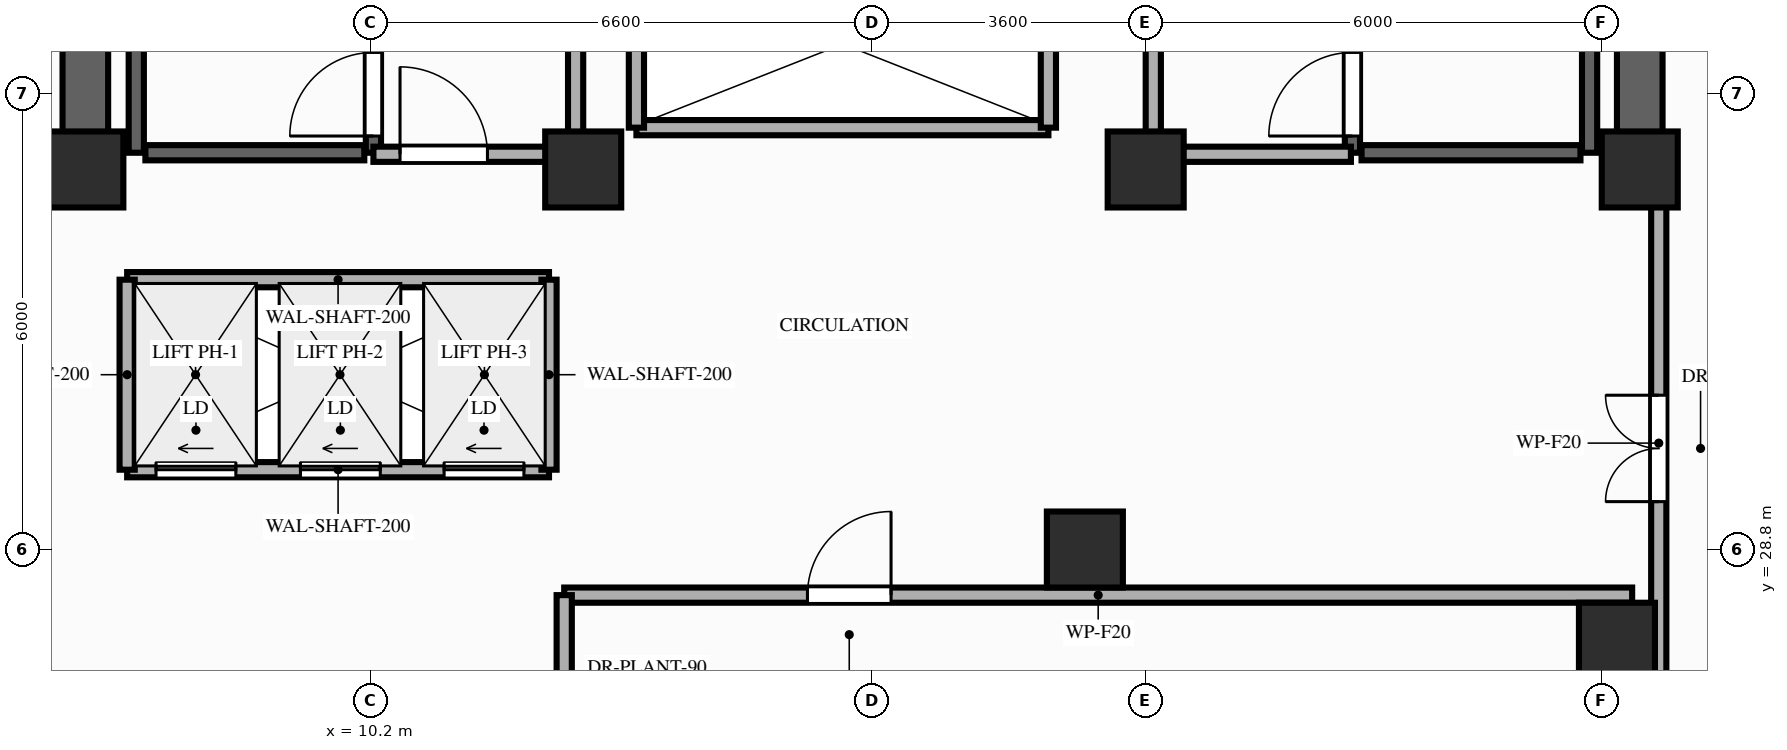
"""IFC4 building model, lengths in metres.
Left out: names, types, materials, properties, quantities, classifications, styles, units other than length and angle.
Written with IfcOpenShell. Run it as: python <this file> out.ifc"""

import sys

from ifc_helpers import new_model, si_unit, direction, frame, frame_2d, origin, origin_2d, place, context, subcontext, project, spatial, rectangle, extrude, element, fill, save


model = new_model("IFC4")
c1 = context("Model", 3, precision=1e-05, world=origin(), true_north=direction((0.0, 1.0)))
c2 = subcontext(c1, "Body", "Model", "MODEL_VIEW")
j1 = project(units=[si_unit("LENGTHUNIT", "METRE"), si_unit("PLANEANGLEUNIT", "RADIAN")], contexts=[c1])
p1 = place(None, origin())
s1 = spatial("IfcSite", under=j1, at=p1, CompositionType="ELEMENT")
p2 = place(p1, origin())
s2 = spatial("IfcBuilding", under=s1, at=p2, CompositionType="ELEMENT")
p3 = place(p2, frame((0.0, 0.0, 156.0)))
s3 = spatial("IfcBuildingStorey", under=s2, at=p3, CompositionType="ELEMENT", Elevation=156.0)
for number, where, z_axis, x_axis in (
    (1, (6.45, 33.8, 0.0), (0.0, 0.0, 1.0), (1.0, 0.0, 0.0)),
    (2, (13.0, 33.8, 0.0), (0.0, 0.0, 1.0), (1.0, 0.0, 0.0)),
    (3, (20.4, 33.8, 0.0), (0.0, 0.0, 1.0), (1.0, 0.0, 0.0)),
    (4, (26.9, 33.8, 0.0), (0.0, 0.0, 1.0), (1.0, 0.0, 0.0)),
    (5, (19.6, 28.8, 0.0), (0.0, 0.0, 1.0), (1.0, 0.0, 0.0)),
    (6, (26.6, 27.6, 0.0), (0.0, 0.0, 1.0), (1.0, 0.0, 0.0)),
):
    element("IfcColumn", number, at=place(p3, frame(where, z_axis=z_axis, x_axis=x_axis)), inside=s3, PredefinedType="COLUMN", context=c2, shape_type="SweptSolid", body=[
        extrude(rectangle(XDim=1.0, YDim=1.0, at=origin_2d()), origin(), (0.0, 0.0, 1.0), 4.0),
    ])
for number, where, z_axis, x_axis in (
    (7, (6.45, 33.8, 0.0), (0.0, 0.0, 1.0), (0.0, 1.0, 0.0)),
    (8, (26.9, 33.8, 0.0), (0.0, 0.0, 1.0), (0.0, 1.0, 0.0)),
):
    element("IfcWall", number, at=place(p3, frame(where, z_axis=z_axis, x_axis=x_axis)), inside=s3, PredefinedType="SHEAR", context=c2, shape_type="SweptSolid", body=[
        extrude(rectangle(XDim=7.95, YDim=0.6, at=frame_2d((3.975, 0.0))), origin(), (0.0, 0.0, 1.0), 3.82),
    ])
p4 = place(p3, frame((7.12, 34.02, 0.0), z_axis=(0.0, 0.0, 1.0), x_axis=(0.0, 1.0, 0.0)))
e9 = element("IfcWall", 9, at=p4, inside=s3, PredefinedType="SHEAR", context=c2, shape_type="SweptSolid", body=[
    extrude(rectangle(XDim=7.78, YDim=0.2, at=frame_2d((3.89, 0.0))), origin(), (0.0, 0.0, 1.0), 3.82),
])
p5 = place(p3, frame((10.24, 34.02, 0.0), z_axis=(0.0, 0.0, 1.0), x_axis=(0.0, 1.0, 0.0)))
e10 = element("IfcWall", 10, at=p5, inside=s3, PredefinedType="SHEAR", context=c2, shape_type="SweptSolid", body=[
    extrude(rectangle(XDim=7.78, YDim=0.2, at=frame_2d((3.89, 0.0))), origin(), (0.0, 0.0, 1.0), 3.82),
])
p6 = place(p5, frame((0.22, 0.0, 0.0)))
e11 = element("IfcOpeningElement", 11, at=p6, cuts=e10, PredefinedType="OPENING", context=c2, shape_type="SweptSolid", body=[
    extrude(rectangle(XDim=1.1, YDim=2.15, at=frame_2d((0.55, 1.075))), frame((0.0, 0.11, 0.0), z_axis=(0.0, -1.0, 0.0), x_axis=(1.0, 0.0, 0.0)), (0.0, 0.0, 1.0), 0.22),
])
p7 = place(p3, frame((7.24, 34.02, 0.0), z_axis=(0.0, 0.0, 1.0), x_axis=(1.0, 0.0, 0.0)))
e12 = element("IfcWall", 12, at=p7, inside=s3, PredefinedType="SHEAR", context=c2, shape_type="SweptSolid", body=[
    extrude(rectangle(XDim=2.88, YDim=0.2, at=frame_2d((1.44, 0.0))), origin(), (0.0, 0.0, 1.0), 3.82),
])
p8 = place(p3, frame((23.12, 34.02, 0.0), z_axis=(0.0, 0.0, 1.0), x_axis=(0.0, 1.0, 0.0)))
e13 = element("IfcWall", 13, at=p8, inside=s3, PredefinedType="SHEAR", context=c2, shape_type="SweptSolid", body=[
    extrude(rectangle(XDim=7.78, YDim=0.2, at=frame_2d((3.89, 0.0))), origin(), (0.0, 0.0, 1.0), 3.82),
])
p9 = place(p8, frame((0.22, 0.0, 0.0)))
e14 = element("IfcOpeningElement", 14, at=p9, cuts=e13, PredefinedType="OPENING", context=c2, shape_type="SweptSolid", body=[
    extrude(rectangle(XDim=1.1, YDim=2.15, at=frame_2d((0.55, 1.075))), frame((0.0, 0.11, 0.0), z_axis=(0.0, -1.0, 0.0), x_axis=(1.0, 0.0, 0.0)), (0.0, 0.0, 1.0), 0.22),
])
p10 = place(p3, frame((26.24, 34.02, 0.0), z_axis=(0.0, 0.0, 1.0), x_axis=(0.0, 1.0, 0.0)))
e15 = element("IfcWall", 15, at=p10, inside=s3, PredefinedType="SHEAR", context=c2, shape_type="SweptSolid", body=[
    extrude(rectangle(XDim=7.78, YDim=0.2, at=frame_2d((3.89, 0.0))), origin(), (0.0, 0.0, 1.0), 3.82),
])
p11 = place(p3, frame((23.24, 34.02, 0.0), z_axis=(0.0, 0.0, 1.0), x_axis=(1.0, 0.0, 0.0)))
e16 = element("IfcWall", 16, at=p11, inside=s3, PredefinedType="SHEAR", context=c2, shape_type="SweptSolid", body=[
    extrude(rectangle(XDim=2.88, YDim=0.2, at=frame_2d((1.44, 0.0))), origin(), (0.0, 0.0, 1.0), 3.82),
])
p12 = place(p3, frame((7.0, 29.85, 0.0), z_axis=(0.0, 0.0, 1.0), x_axis=(1.0, 0.0, 0.0)))
e17 = element("IfcWall", 17, at=p12, inside=s3, PredefinedType="MOVABLE", context=c2, shape_type="SweptSolid", body=[
    extrude(rectangle(XDim=5.55, YDim=0.2, at=frame_2d((2.775, 0.0))), origin(), (0.0, 0.0, 1.0), 3.82),
])
p13 = place(p12, frame((0.38, 0.0, 0.0)))
e18 = element("IfcOpeningElement", 18, at=p13, cuts=e17, PredefinedType="OPENING", context=c2, shape_type="SweptSolid", body=[
    extrude(rectangle(XDim=1.05, YDim=2.15, at=frame_2d((0.525, 1.075))), frame((0.0, 0.11, 0.0), z_axis=(0.0, -1.0, 0.0), x_axis=(1.0, 0.0, 0.0)), (0.0, 0.0, 1.0), 0.22),
])
p14 = place(p12, frame((2.28, 0.0, 0.0)))
e19 = element("IfcOpeningElement", 19, at=p14, cuts=e17, PredefinedType="OPENING", context=c2, shape_type="SweptSolid", body=[
    extrude(rectangle(XDim=1.05, YDim=2.15, at=frame_2d((0.525, 1.075))), frame((0.0, 0.11, 0.0), z_axis=(0.0, -1.0, 0.0), x_axis=(1.0, 0.0, 0.0)), (0.0, 0.0, 1.0), 0.22),
])
p15 = place(p12, frame((4.17, 0.0, 0.0)))
e20 = element("IfcOpeningElement", 20, at=p15, cuts=e17, PredefinedType="OPENING", context=c2, shape_type="SweptSolid", body=[
    extrude(rectangle(XDim=1.05, YDim=2.15, at=frame_2d((0.525, 1.075))), frame((0.0, 0.11, 0.0), z_axis=(0.0, -1.0, 0.0), x_axis=(1.0, 0.0, 0.0)), (0.0, 0.0, 1.0), 0.22),
])
p16 = place(p3, frame((7.0, 32.35, 0.0), z_axis=(0.0, 0.0, 1.0), x_axis=(1.0, 0.0, 0.0)))
e21 = element("IfcWall", 21, at=p16, inside=s3, PredefinedType="MOVABLE", context=c2, shape_type="SweptSolid", body=[
    extrude(rectangle(XDim=5.55, YDim=0.2, at=frame_2d((2.775, 0.0))), origin(), (0.0, 0.0, 1.0), 3.82),
])
for number, where, z_axis, x_axis in (
    (22, (7.0, 29.85, 0.0), (0.0, 0.0, 1.0), (0.0, 1.0, 0.0)),
    (23, (12.55, 29.85, 0.0), (0.0, 0.0, 1.0), (0.0, 1.0, 0.0)),
):
    element("IfcWall", number, at=place(p3, frame(where, z_axis=z_axis, x_axis=x_axis)), inside=s3, PredefinedType="MOVABLE", context=c2, shape_type="SweptSolid", body=[
        extrude(rectangle(XDim=2.5, YDim=0.2, at=frame_2d((1.25, 0.0))), origin(), (0.0, 0.0, 1.0), 3.82),
    ])
p17 = place(p3, frame((12.9, 34.0, 0.0), z_axis=(0.0, 0.0, 1.0), x_axis=(0.0, 1.0, 0.0)))
e24 = element("IfcWall", 24, at=p17, inside=s3, PredefinedType="PARTITIONING", context=c2, shape_type="SweptSolid", body=[
    extrude(rectangle(XDim=5.45, YDim=0.2, at=frame_2d((2.725, 0.0))), origin(), (0.0, 0.0, 1.0), 3.25),
])
p18 = place(p3, frame((10.24, 34.0, 0.0), z_axis=(0.0, 0.0, 1.0), x_axis=(1.0, 0.0, 0.0)))
e25 = element("IfcWall", 25, at=p18, inside=s3, PredefinedType="PARTITIONING", context=c2, shape_type="SweptSolid", body=[
    extrude(rectangle(XDim=2.66, YDim=0.2, at=frame_2d((1.33, 0.0))), origin(), (0.0, 0.0, 1.0), 3.25),
])
p19 = place(p18, frame((0.35, 0.0, 0.0)))
e26 = element("IfcOpeningElement", 26, at=p19, cuts=e25, PredefinedType="OPENING", context=c2, shape_type="SweptSolid", body=[
    extrude(rectangle(XDim=1.15, YDim=2.15, at=frame_2d((0.575, 1.075))), frame((0.0, 0.11, 0.0), z_axis=(0.0, -1.0, 0.0), x_axis=(1.0, 0.0, 0.0)), (0.0, 0.0, 1.0), 0.22),
])
p20 = place(p3, frame((20.5, 34.0, 0.0), z_axis=(0.0, 0.0, 1.0), x_axis=(0.0, 1.0, 0.0)))
e27 = element("IfcWall", 27, at=p20, inside=s3, PredefinedType="PARTITIONING", context=c2, shape_type="SweptSolid", body=[
    extrude(rectangle(XDim=5.45, YDim=0.2, at=frame_2d((2.725, 0.0))), origin(), (0.0, 0.0, 1.0), 3.25),
])
p21 = place(p20, frame((2.0, 0.0, 0.0)))
e28 = element("IfcOpeningElement", 28, at=p21, cuts=e27, PredefinedType="OPENING", context=c2, shape_type="SweptSolid", body=[
    extrude(rectangle(XDim=1.15, YDim=2.15, at=frame_2d((0.575, 1.075))), frame((0.0, 0.11, 0.0), z_axis=(0.0, -1.0, 0.0), x_axis=(1.0, 0.0, 0.0)), (0.0, 0.0, 1.0), 0.22),
])
p22 = place(p3, frame((20.5, 34.0, 0.0), z_axis=(0.0, 0.0, 1.0), x_axis=(1.0, 0.0, 0.0)))
e29 = element("IfcWall", 29, at=p22, inside=s3, PredefinedType="PARTITIONING", context=c2, shape_type="SweptSolid", body=[
    extrude(rectangle(XDim=2.6, YDim=0.2, at=frame_2d((1.3, 0.0))), origin(), (0.0, 0.0, 1.0), 3.25),
])
p23 = place(p3, frame((13.7, 34.35, 0.0), z_axis=(0.0, 0.0, 1.0), x_axis=(1.0, 0.0, 0.0)))
e30 = element("IfcWall", 30, at=p23, inside=s3, PredefinedType="MOVABLE", context=c2, shape_type="SweptSolid", body=[
    extrude(rectangle(XDim=5.42, YDim=0.2, at=frame_2d((2.71, 0.0))), origin(), (0.0, 0.0, 1.0), 3.82),
])
for number, where, z_axis, x_axis in (
    (31, (13.7, 34.35, 0.0), (0.0, 0.0, 1.0), (0.0, 1.0, 0.0)),
    (32, (19.12, 34.35, 0.0), (0.0, 0.0, 1.0), (0.0, 1.0, 0.0)),
):
    element("IfcWall", number, at=place(p3, frame(where, z_axis=z_axis, x_axis=x_axis)), inside=s3, PredefinedType="MOVABLE", context=c2, shape_type="SweptSolid", body=[
        extrude(rectangle(XDim=2.2, YDim=0.2, at=frame_2d((1.1, 0.0))), origin(), (0.0, 0.0, 1.0), 3.82),
    ])
p24 = place(p3, frame((12.75, 28.2, 0.0), z_axis=(0.0, 0.0, 1.0), x_axis=(1.0, 0.0, 0.0)))
e33 = element("IfcWall", 33, at=p24, inside=s3, PredefinedType="PARTITIONING", context=c2, shape_type="SweptSolid", body=[
    extrude(rectangle(XDim=14.05, YDim=0.2, at=frame_2d((7.025, 0.0))), origin(), (0.0, 0.0, 1.0), 3.25),
])
p25 = place(p24, frame((3.2, 0.0, 0.0)))
e34 = element("IfcOpeningElement", 34, at=p25, cuts=e33, PredefinedType="OPENING", context=c2, shape_type="SweptSolid", body=[
    extrude(rectangle(XDim=1.1, YDim=2.15, at=frame_2d((0.55, 1.075))), frame((0.0, 0.11, 0.0), z_axis=(0.0, -1.0, 0.0), x_axis=(1.0, 0.0, 0.0)), (0.0, 0.0, 1.0), 0.22),
])
p26 = place(p3, frame((12.75, 8.75, 0.0), z_axis=(0.0, 0.0, 1.0), x_axis=(0.0, 1.0, 0.0)))
e35 = element("IfcWall", 35, at=p26, inside=s3, PredefinedType="PARTITIONING", context=c2, shape_type="SweptSolid", body=[
    extrude(rectangle(XDim=19.45, YDim=0.2, at=frame_2d((9.725, 0.0))), origin(), (0.0, 0.0, 1.0), 3.25),
])
p27 = place(p26, frame((16.85, 0.0, 0.0)))
e36 = element("IfcOpeningElement", 36, at=p27, cuts=e35, PredefinedType="OPENING", context=c2, shape_type="SweptSolid", body=[
    extrude(rectangle(XDim=1.4, YDim=2.2, at=frame_2d((0.7, 1.1))), frame((0.0, 0.11, 0.0), z_axis=(0.0, -1.0, 0.0), x_axis=(1.0, 0.0, 0.0)), (0.0, 0.0, 1.0), 0.22),
])
p28 = place(p3, frame((27.15, 26.75, 0.0), z_axis=(0.0, 0.0, 1.0), x_axis=(0.0, 1.0, 0.0)))
e37 = element("IfcWall", 37, at=p28, inside=s3, PredefinedType="PARTITIONING", context=c2, shape_type="SweptSolid", body=[
    extrude(rectangle(XDim=6.9, YDim=0.2, at=frame_2d((3.45, 0.0))), origin(), (0.0, 0.0, 1.0), 3.25),
])
p29 = place(p28, frame((2.68, 0.0, 0.0)))
e38 = element("IfcOpeningElement", 38, at=p29, cuts=e37, PredefinedType="OPENING", context=c2, shape_type="SweptSolid", body=[
    extrude(rectangle(XDim=1.4, YDim=2.2, at=frame_2d((0.7, 1.1))), frame((0.0, 0.11, 0.0), z_axis=(0.0, -1.0, 0.0), x_axis=(1.0, 0.0, 0.0)), (0.0, 0.0, 1.0), 0.22),
])
p30 = place(p6, origin())
e39 = element("IfcDoor", 39, at=p30, inside=s3, OperationType="SINGLE_SWING_LEFT", PredefinedType="DOOR", context=c2, shape_type="SweptSolid", body=[
    extrude(rectangle(XDim=1.1, YDim=2.15, at=frame_2d((0.55, 1.075))), frame((0.0, 0.025, 0.0), z_axis=(0.0, -1.0, 0.0), x_axis=(1.0, 0.0, 0.0)), (0.0, 0.0, 1.0), 0.05),
])
fill(e11, e39)
p31 = place(p9, origin())
e40 = element("IfcDoor", 40, at=p31, inside=s3, OperationType="SINGLE_SWING_LEFT", PredefinedType="DOOR", context=c2, shape_type="SweptSolid", body=[
    extrude(rectangle(XDim=1.1, YDim=2.15, at=frame_2d((0.55, 1.075))), frame((0.0, 0.025, 0.0), z_axis=(0.0, -1.0, 0.0), x_axis=(1.0, 0.0, 0.0)), (0.0, 0.0, 1.0), 0.05),
])
fill(e14, e40)
p32 = place(p13, origin())
e41 = element("IfcDoor", 41, at=p32, inside=s3, OperationType="SLIDING_TO_LEFT", PredefinedType="DOOR", context=c2, shape_type="SweptSolid", body=[
    extrude(rectangle(XDim=1.05, YDim=2.15, at=frame_2d((0.525, 1.075))), frame((0.0, 0.025, 0.0), z_axis=(0.0, -1.0, 0.0), x_axis=(1.0, 0.0, 0.0)), (0.0, 0.0, 1.0), 0.05),
])
fill(e18, e41)
p33 = place(p14, origin())
e42 = element("IfcDoor", 42, at=p33, inside=s3, OperationType="SLIDING_TO_LEFT", PredefinedType="DOOR", context=c2, shape_type="SweptSolid", body=[
    extrude(rectangle(XDim=1.05, YDim=2.15, at=frame_2d((0.525, 1.075))), frame((0.0, 0.025, 0.0), z_axis=(0.0, -1.0, 0.0), x_axis=(1.0, 0.0, 0.0)), (0.0, 0.0, 1.0), 0.05),
])
fill(e19, e42)
p34 = place(p15, origin())
e43 = element("IfcDoor", 43, at=p34, inside=s3, OperationType="SLIDING_TO_LEFT", PredefinedType="DOOR", context=c2, shape_type="SweptSolid", body=[
    extrude(rectangle(XDim=1.05, YDim=2.15, at=frame_2d((0.525, 1.075))), frame((0.0, 0.025, 0.0), z_axis=(0.0, -1.0, 0.0), x_axis=(1.0, 0.0, 0.0)), (0.0, 0.0, 1.0), 0.05),
])
fill(e20, e43)
p35 = place(p19, origin())
e44 = element("IfcDoor", 44, at=p35, inside=s3, OperationType="SINGLE_SWING_LEFT", PredefinedType="DOOR", context=c2, shape_type="SweptSolid", body=[
    extrude(rectangle(XDim=1.15, YDim=2.15, at=frame_2d((0.575, 1.075))), frame((0.0, 0.025, 0.0), z_axis=(0.0, -1.0, 0.0), x_axis=(1.0, 0.0, 0.0)), (0.0, 0.0, 1.0), 0.05),
])
fill(e26, e44)
p36 = place(p25, origin())
e45 = element("IfcDoor", 45, at=p36, inside=s3, OperationType="SINGLE_SWING_RIGHT", PredefinedType="DOOR", context=c2, shape_type="SweptSolid", body=[
    extrude(rectangle(XDim=1.1, YDim=2.15, at=frame_2d((0.55, 1.075))), frame((0.0, 0.025, 0.0), z_axis=(0.0, -1.0, 0.0), x_axis=(1.0, 0.0, 0.0)), (0.0, 0.0, 1.0), 0.05),
])
fill(e34, e45)
p37 = place(p29, origin())
e46 = element("IfcDoor", 46, at=p37, inside=s3, OperationType="DOUBLE_DOOR_SINGLE_SWING", PredefinedType="DOOR", context=c2, shape_type="SweptSolid", body=[
    extrude(rectangle(XDim=1.4, YDim=2.2, at=frame_2d((0.7, 1.1))), frame((0.0, 0.025, 0.0), z_axis=(0.0, -1.0, 0.0), x_axis=(1.0, 0.0, 0.0)), (0.0, 0.0, 1.0), 0.05),
])
fill(e38, e46)
save(model, sys.argv[1])
